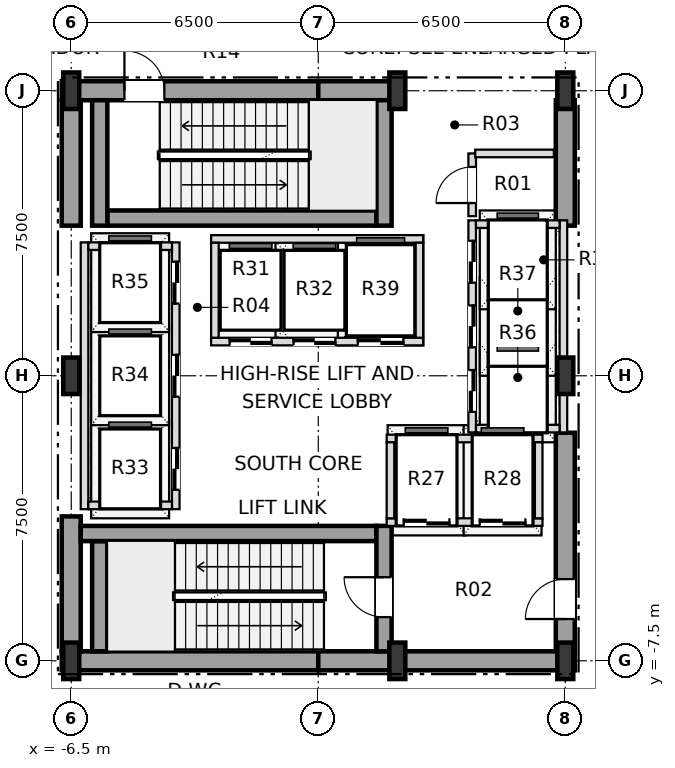
"""IFC4 building model, lengths in metres.
Left out: names, types, materials, properties, quantities, classifications, styles, units other than length and angle.
Written with IfcOpenShell. Run it as: python <this file> out.ifc"""

import sys

from ifc_helpers import new_model, si_unit, direction, frame, frame_2d, origin, origin_2d, place, context, subcontext, project, spatial, rectangle, i_section, extrude, element, fill, save


model = new_model("IFC4")
c1 = context("Model", 3, precision=1e-05, world=origin(), true_north=direction((0.0, 1.0)))
c2 = subcontext(c1, "Body", "Model", "MODEL_VIEW")
j1 = project(units=[si_unit("LENGTHUNIT", "METRE"), si_unit("PLANEANGLEUNIT", "RADIAN")], contexts=[c1])
p1 = place(None, origin())
s1 = spatial("IfcSite", under=j1, at=p1, CompositionType="ELEMENT")
p2 = place(p1, origin())
s2 = spatial("IfcBuilding", under=s1, at=p2, CompositionType="ELEMENT")
p3 = place(p2, frame((0.0, 0.0, 22.2)))
s3 = spatial("IfcBuildingStorey", under=s2, at=p3, CompositionType="ELEMENT", Elevation=22.2)
for number, where, z_axis, x_axis in (
    (1, (-6.5, -7.5, 0.0), (0.0, 0.0, 1.0), (1.0, 0.0, 0.0)),
    (2, (2.08, -7.5, 0.0), (0.0, 0.0, 1.0), (1.0, 0.0, 0.0)),
    (3, (6.5, -7.5, 0.0), (0.0, 0.0, 1.0), (1.0, 0.0, 0.0)),
    (4, (-6.5, 0.0, 0.0), (0.0, 0.0, 1.0), (1.0, 0.0, 0.0)),
    (5, (6.5, 0.0, 0.0), (0.0, 0.0, 1.0), (1.0, 0.0, 0.0)),
    (6, (-6.5, 7.5, 0.0), (0.0, 0.0, 1.0), (1.0, 0.0, 0.0)),
    (7, (2.08, 7.5, 0.0), (0.0, 0.0, 1.0), (1.0, 0.0, 0.0)),
    (8, (6.5, 7.5, 0.0), (0.0, 0.0, 1.0), (1.0, 0.0, 0.0)),
):
    element("IfcColumn", number, at=place(p3, frame(where, z_axis=z_axis, x_axis=x_axis)), inside=s3, PredefinedType="COLUMN", context=c2, shape_type="SweptSolid", body=[
        extrude(i_section(OverallWidth=0.42, OverallDepth=0.96, WebThickness=0.022, FlangeThickness=0.034, at=origin_2d()), origin(), (0.0, 0.0, 1.0), 5.4),
    ])
for number, where, z_axis, x_axis in (
    (9, (-6.75, -7.5, 0.0), (0.0, 0.0, 1.0), (1.0, 0.0, 0.0)),
    (10, (0.0, -7.5, 0.0), (0.0, 0.0, 1.0), (1.0, 0.0, 0.0)),
):
    element("IfcWall", number, at=place(p3, frame(where, z_axis=z_axis, x_axis=x_axis)), inside=s3, PredefinedType="SHEAR", context=c2, shape_type="SweptSolid", body=[
        extrude(rectangle(XDim=6.75, YDim=0.5, at=frame_2d((3.375, 0.0))), origin(), (0.0, 0.0, 1.0), 5.0),
    ])
p4 = place(p3, frame((-6.75, 7.5, 0.0), z_axis=(0.0, 0.0, 1.0), x_axis=(1.0, 0.0, 0.0)))
e11 = element("IfcWall", 11, at=p4, inside=s3, PredefinedType="SHEAR", context=c2, shape_type="SweptSolid", body=[
    extrude(rectangle(XDim=6.75, YDim=0.5, at=frame_2d((3.375, 0.0))), origin(), (0.0, 0.0, 1.0), 5.0),
])
p5 = place(p4, frame((1.65, 0.0, 0.0)))
e12 = element("IfcOpeningElement", 12, at=p5, cuts=e11, PredefinedType="OPENING", context=c2, shape_type="SweptSolid", body=[
    extrude(rectangle(XDim=1.05, YDim=2.15, at=frame_2d((0.525, 1.075))), frame((0.0, 0.26, 0.0), z_axis=(0.0, -1.0, 0.0), x_axis=(1.0, 0.0, 0.0)), (0.0, 0.0, 1.0), 0.52),
])
p6 = place(p3, frame((0.0, 7.5, 0.0), z_axis=(0.0, 0.0, 1.0), x_axis=(1.0, 0.0, 0.0)))
e13 = element("IfcWall", 13, at=p6, inside=s3, PredefinedType="SHEAR", context=c2, shape_type="SweptSolid", body=[
    extrude(rectangle(XDim=2.08, YDim=0.5, at=frame_2d((1.04, 0.0))), origin(), (0.0, 0.0, 1.0), 5.0),
])
p7 = place(p3, frame((-6.5, -7.25, 0.0), z_axis=(0.0, 0.0, 1.0), x_axis=(0.0, 1.0, 0.0)))
e14 = element("IfcWall", 14, at=p7, inside=s3, PredefinedType="SHEAR", context=c2, shape_type="SweptSolid", body=[
    extrude(rectangle(XDim=3.55, YDim=0.5, at=frame_2d((1.775, 0.0))), origin(), (0.0, 0.0, 1.0), 5.0),
])
p8 = place(p3, frame((-6.5, 3.95, 0.0), z_axis=(0.0, 0.0, 1.0), x_axis=(0.0, 1.0, 0.0)))
e15 = element("IfcWall", 15, at=p8, inside=s3, PredefinedType="SHEAR", context=c2, shape_type="SweptSolid", body=[
    extrude(rectangle(XDim=3.3, YDim=0.5, at=frame_2d((1.65, 0.0))), origin(), (0.0, 0.0, 1.0), 5.0),
])
p9 = place(p3, frame((6.5, -7.25, 0.0), z_axis=(0.0, 0.0, 1.0), x_axis=(0.0, 1.0, 0.0)))
e16 = element("IfcWall", 16, at=p9, inside=s3, PredefinedType="SHEAR", context=c2, shape_type="SweptSolid", body=[
    extrude(rectangle(XDim=5.75, YDim=0.5, at=frame_2d((2.875, 0.0))), origin(), (0.0, 0.0, 1.0), 5.0),
])
p10 = place(p9, frame((0.85, 0.0, 0.0)))
e17 = element("IfcOpeningElement", 17, at=p10, cuts=e16, PredefinedType="OPENING", context=c2, shape_type="SweptSolid", body=[
    extrude(rectangle(XDim=1.05, YDim=2.15, at=frame_2d((0.525, 1.075))), frame((0.0, 0.26, 0.0), z_axis=(0.0, -1.0, 0.0), x_axis=(1.0, 0.0, 0.0)), (0.0, 0.0, 1.0), 0.52),
])
p11 = place(p3, frame((6.5, 3.95, 0.0), z_axis=(0.0, 0.0, 1.0), x_axis=(0.0, 1.0, 0.0)))
e18 = element("IfcWall", 18, at=p11, inside=s3, PredefinedType="SHEAR", context=c2, shape_type="SweptSolid", body=[
    extrude(rectangle(XDim=3.3, YDim=0.5, at=frame_2d((1.65, 0.0))), origin(), (0.0, 0.0, 1.0), 5.0),
])
p12 = place(p3, frame((-5.75, -7.25, 0.0), z_axis=(0.0, 0.0, 1.0), x_axis=(0.0, 1.0, 0.0)))
e19 = element("IfcWall", 19, at=p12, inside=s3, PredefinedType="SHEAR", context=c2, shape_type="SweptSolid", body=[
    extrude(rectangle(XDim=2.9, YDim=0.4, at=frame_2d((1.45, 0.0))), origin(), (0.0, 0.0, 1.0), 5.0),
])
p13 = place(p3, frame((-6.25, -4.15, 0.0), z_axis=(0.0, 0.0, 1.0), x_axis=(1.0, 0.0, 0.0)))
e20 = element("IfcWall", 20, at=p13, inside=s3, PredefinedType="SHEAR", context=c2, shape_type="SweptSolid", body=[
    extrude(rectangle(XDim=7.78, YDim=0.4, at=frame_2d((3.89, 0.0))), origin(), (0.0, 0.0, 1.0), 5.0),
])
p14 = place(p3, frame((1.73, -7.25, 0.0), z_axis=(0.0, 0.0, 1.0), x_axis=(0.0, 1.0, 0.0)))
e21 = element("IfcWall", 21, at=p14, inside=s3, PredefinedType="SHEAR", context=c2, shape_type="SweptSolid", body=[
    extrude(rectangle(XDim=3.3, YDim=0.4, at=frame_2d((1.65, 0.0))), origin(), (0.0, 0.0, 1.0), 5.0),
])
p15 = place(p14, frame((0.9, 0.0, 0.0)))
e22 = element("IfcOpeningElement", 22, at=p15, cuts=e21, PredefinedType="OPENING", context=c2, shape_type="SweptSolid", body=[
    extrude(rectangle(XDim=1.05, YDim=2.15, at=frame_2d((0.525, 1.075))), frame((0.0, 0.21, 0.0), z_axis=(0.0, -1.0, 0.0), x_axis=(1.0, 0.0, 0.0)), (0.0, 0.0, 1.0), 0.42),
])
p16 = place(p3, frame((-5.55, 4.15, 0.0), z_axis=(0.0, 0.0, 1.0), x_axis=(1.0, 0.0, 0.0)))
e23 = element("IfcWall", 23, at=p16, inside=s3, PredefinedType="SHEAR", context=c2, shape_type="SweptSolid", body=[
    extrude(rectangle(XDim=7.08, YDim=0.4, at=frame_2d((3.54, 0.0))), origin(), (0.0, 0.0, 1.0), 5.0),
])
for number, where, z_axis, x_axis in (
    (24, (1.73, 3.95, 0.0), (0.0, 0.0, 1.0), (0.0, 1.0, 0.0)),
    (25, (-5.75, 3.95, 0.0), (0.0, 0.0, 1.0), (0.0, 1.0, 0.0)),
):
    element("IfcWall", number, at=place(p3, frame(where, z_axis=z_axis, x_axis=x_axis)), inside=s3, PredefinedType="SHEAR", context=c2, shape_type="SweptSolid", body=[
        extrude(rectangle(XDim=3.3, YDim=0.4, at=frame_2d((1.65, 0.0))), origin(), (0.0, 0.0, 1.0), 5.0),
    ])
p17 = place(p3, frame((-3.75, -3.51, 0.0), z_axis=(0.0, 0.0, 1.0), x_axis=(0.0, 1.0, 0.0)))
e26 = element("IfcWall", 26, at=p17, inside=s3, PredefinedType="SOLIDWALL", context=c2, shape_type="SweptSolid", body=[
    extrude(rectangle(XDim=7.02, YDim=0.2, at=frame_2d((3.51, 0.0))), origin(), (0.0, 0.0, 1.0), 5.0),
])
p18 = place(p17, frame((0.51, 0.0, 0.0)))
e27 = element("IfcOpeningElement", 27, at=p18, cuts=e26, PredefinedType="OPENING", context=c2, shape_type="SweptSolid", body=[
    extrude(rectangle(XDim=1.1, YDim=2.15, at=frame_2d((0.55, 1.075))), frame((0.0, 0.11, 0.0), z_axis=(0.0, -1.0, 0.0), x_axis=(1.0, 0.0, 0.0)), (0.0, 0.0, 1.0), 0.22),
])
p19 = place(p17, frame((2.96, 0.0, 0.0)))
e28 = element("IfcOpeningElement", 28, at=p19, cuts=e26, PredefinedType="OPENING", context=c2, shape_type="SweptSolid", body=[
    extrude(rectangle(XDim=1.1, YDim=2.15, at=frame_2d((0.55, 1.075))), frame((0.0, 0.11, 0.0), z_axis=(0.0, -1.0, 0.0), x_axis=(1.0, 0.0, 0.0)), (0.0, 0.0, 1.0), 0.22),
])
p20 = place(p17, frame((5.41, 0.0, 0.0)))
e29 = element("IfcOpeningElement", 29, at=p20, cuts=e26, PredefinedType="OPENING", context=c2, shape_type="SweptSolid", body=[
    extrude(rectangle(XDim=1.1, YDim=2.15, at=frame_2d((0.55, 1.075))), frame((0.0, 0.11, 0.0), z_axis=(0.0, -1.0, 0.0), x_axis=(1.0, 0.0, 0.0)), (0.0, 0.0, 1.0), 0.22),
])
p21 = place(p3, frame((-6.15, -3.51, 0.0), z_axis=(0.0, 0.0, 1.0), x_axis=(0.0, 1.0, 0.0)))
e30 = element("IfcWall", 30, at=p21, inside=s3, PredefinedType="SOLIDWALL", context=c2, shape_type="SweptSolid", body=[
    extrude(rectangle(XDim=7.02, YDim=0.2, at=frame_2d((3.51, 0.0))), origin(), (0.0, 0.0, 1.0), 5.0),
])
for number, where, z_axis, x_axis in (
    (31, (-6.05, -3.41, 0.0), (0.0, 0.0, 1.0), (1.0, 0.0, 0.0)),
    (32, (-6.05, 3.41, 0.0), (0.0, 0.0, 1.0), (1.0, 0.0, 0.0)),
):
    element("IfcWall", number, at=place(p3, frame(where, z_axis=z_axis, x_axis=x_axis)), inside=s3, PredefinedType="SOLIDWALL", context=c2, shape_type="SweptSolid", body=[
        extrude(rectangle(XDim=2.2, YDim=0.2, at=frame_2d((1.1, 0.0))), origin(), (0.0, 0.0, 1.0), 5.0),
    ])
p22 = place(p3, frame((4.05, -1.49, 0.0), z_axis=(0.0, 0.0, 1.0), x_axis=(0.0, 1.0, 0.0)))
e33 = element("IfcWall", 33, at=p22, inside=s3, PredefinedType="SOLIDWALL", context=c2, shape_type="SweptSolid", body=[
    extrude(rectangle(XDim=5.58, YDim=0.2, at=frame_2d((2.79, 0.0))), origin(), (0.0, 0.0, 1.0), 5.0),
])
p23 = place(p22, frame((0.54, 0.0, 0.0)))
e34 = element("IfcOpeningElement", 34, at=p23, cuts=e33, PredefinedType="OPENING", context=c2, shape_type="SweptSolid", body=[
    extrude(rectangle(XDim=1.1, YDim=2.15, at=frame_2d((0.55, 1.075))), frame((0.0, 0.11, 0.0), z_axis=(0.0, -1.0, 0.0), x_axis=(1.0, 0.0, 0.0)), (0.0, 0.0, 1.0), 0.22),
])
p24 = place(p22, frame((2.24, 0.0, 0.0)))
e35 = element("IfcOpeningElement", 35, at=p24, cuts=e33, PredefinedType="OPENING", context=c2, shape_type="SweptSolid", body=[
    extrude(rectangle(XDim=1.1, YDim=2.15, at=frame_2d((0.55, 1.075))), frame((0.0, 0.11, 0.0), z_axis=(0.0, -1.0, 0.0), x_axis=(1.0, 0.0, 0.0)), (0.0, 0.0, 1.0), 0.22),
])
p25 = place(p22, frame((3.94, 0.0, 0.0)))
e36 = element("IfcOpeningElement", 36, at=p25, cuts=e33, PredefinedType="OPENING", context=c2, shape_type="SweptSolid", body=[
    extrude(rectangle(XDim=1.1, YDim=2.15, at=frame_2d((0.55, 1.075))), frame((0.0, 0.11, 0.0), z_axis=(0.0, -1.0, 0.0), x_axis=(1.0, 0.0, 0.0)), (0.0, 0.0, 1.0), 0.22),
])
p26 = place(p3, frame((6.45, -1.49, 0.0), z_axis=(0.0, 0.0, 1.0), x_axis=(0.0, 1.0, 0.0)))
e37 = element("IfcWall", 37, at=p26, inside=s3, PredefinedType="SOLIDWALL", context=c2, shape_type="SweptSolid", body=[
    extrude(rectangle(XDim=5.58, YDim=0.2, at=frame_2d((2.79, 0.0))), origin(), (0.0, 0.0, 1.0), 4.436),
])
for number, where, z_axis, x_axis in (
    (38, (4.15, -1.39, 0.0), (0.0, 0.0, 1.0), (1.0, 0.0, 0.0)),
    (39, (4.15, 3.99, 0.0), (0.0, 0.0, 1.0), (1.0, 0.0, 0.0)),
):
    element("IfcWall", number, at=place(p3, frame(where, z_axis=z_axis, x_axis=x_axis)), inside=s3, PredefinedType="SOLIDWALL", context=c2, shape_type="SweptSolid", body=[
        extrude(rectangle(XDim=2.2, YDim=0.2, at=frame_2d((1.1, 0.0))), origin(), (0.0, 0.0, 1.0), 5.0),
    ])
p27 = place(p3, frame((-2.82, 0.9, 0.0), z_axis=(0.0, 0.0, 1.0), x_axis=(1.0, 0.0, 0.0)))
e40 = element("IfcWall", 40, at=p27, inside=s3, PredefinedType="SOLIDWALL", context=c2, shape_type="SweptSolid", body=[
    extrude(rectangle(XDim=5.58, YDim=0.2, at=frame_2d((2.79, 0.0))), origin(), (0.0, 0.0, 1.0), 5.0),
])
p28 = place(p27, frame((0.49, 0.0, 0.0)))
e41 = element("IfcOpeningElement", 41, at=p28, cuts=e40, PredefinedType="OPENING", context=c2, shape_type="SweptSolid", body=[
    extrude(rectangle(XDim=1.1, YDim=2.15, at=frame_2d((0.55, 1.075))), frame((0.0, 0.11, 0.0), z_axis=(0.0, -1.0, 0.0), x_axis=(1.0, 0.0, 0.0)), (0.0, 0.0, 1.0), 0.22),
])
p29 = place(p27, frame((2.17, 0.0, 0.0)))
e42 = element("IfcOpeningElement", 42, at=p29, cuts=e40, PredefinedType="OPENING", context=c2, shape_type="SweptSolid", body=[
    extrude(rectangle(XDim=1.1, YDim=2.15, at=frame_2d((0.55, 1.075))), frame((0.0, 0.11, 0.0), z_axis=(0.0, -1.0, 0.0), x_axis=(1.0, 0.0, 0.0)), (0.0, 0.0, 1.0), 0.22),
])
p30 = place(p27, frame((3.86, 0.0, 0.0)))
e43 = element("IfcOpeningElement", 43, at=p30, cuts=e40, PredefinedType="OPENING", context=c2, shape_type="SweptSolid", body=[
    extrude(rectangle(XDim=1.2, YDim=2.2, at=frame_2d((0.6, 1.1))), frame((0.0, 0.11, 0.0), z_axis=(0.0, -1.0, 0.0), x_axis=(1.0, 0.0, 0.0)), (0.0, 0.0, 1.0), 0.22),
])
p31 = place(p3, frame((-2.82, 3.6, 0.0), z_axis=(0.0, 0.0, 1.0), x_axis=(1.0, 0.0, 0.0)))
e44 = element("IfcWall", 44, at=p31, inside=s3, PredefinedType="SOLIDWALL", context=c2, shape_type="SweptSolid", body=[
    extrude(rectangle(XDim=5.58, YDim=0.2, at=frame_2d((2.79, 0.0))), origin(), (0.0, 0.0, 1.0), 5.0),
])
for number, where, z_axis, x_axis in (
    (45, (-2.72, 1.0, 0.0), (0.0, 0.0, 1.0), (0.0, 1.0, 0.0)),
    (46, (2.66, 1.0, 0.0), (0.0, 0.0, 1.0), (0.0, 1.0, 0.0)),
):
    element("IfcWall", number, at=place(p3, frame(where, z_axis=z_axis, x_axis=x_axis)), inside=s3, PredefinedType="SOLIDWALL", context=c2, shape_type="SweptSolid", body=[
        extrude(rectangle(XDim=2.5, YDim=0.2, at=frame_2d((1.25, 0.0))), origin(), (0.0, 0.0, 1.0), 5.0),
    ])
p32 = place(p3, frame((1.8, -3.85, 0.0), z_axis=(0.0, 0.0, 1.0), x_axis=(1.0, 0.0, 0.0)))
e47 = element("IfcWall", 47, at=p32, inside=s3, PredefinedType="SOLIDWALL", context=c2, shape_type="SweptSolid", body=[
    extrude(rectangle(XDim=4.1, YDim=0.2, at=frame_2d((2.05, 0.0))), origin(), (0.0, 0.0, 1.0), 5.0),
])
p33 = place(p32, frame((0.45, 0.0, 0.0)))
e48 = element("IfcOpeningElement", 48, at=p33, cuts=e47, PredefinedType="OPENING", context=c2, shape_type="SweptSolid", body=[
    extrude(rectangle(XDim=1.2, YDim=2.2, at=frame_2d((0.6, 1.1))), frame((0.0, 0.11, 0.0), z_axis=(0.0, -1.0, 0.0), x_axis=(1.0, 0.0, 0.0)), (0.0, 0.0, 1.0), 0.22),
])
p34 = place(p32, frame((2.45, 0.0, 0.0)))
e49 = element("IfcOpeningElement", 49, at=p34, cuts=e47, PredefinedType="OPENING", context=c2, shape_type="SweptSolid", body=[
    extrude(rectangle(XDim=1.2, YDim=2.2, at=frame_2d((0.6, 1.1))), frame((0.0, 0.11, 0.0), z_axis=(0.0, -1.0, 0.0), x_axis=(1.0, 0.0, 0.0)), (0.0, 0.0, 1.0), 0.22),
])
p35 = place(p3, frame((1.8, -1.65, 0.0), z_axis=(0.0, 0.0, 1.0), x_axis=(1.0, 0.0, 0.0)))
e50 = element("IfcWall", 50, at=p35, inside=s3, PredefinedType="SOLIDWALL", context=c2, shape_type="SweptSolid", body=[
    extrude(rectangle(XDim=4.1, YDim=0.2, at=frame_2d((2.05, 0.0))), origin(), (0.0, 0.0, 1.0), 5.0),
])
for number, where, z_axis, x_axis in (
    (51, (1.9, -3.75, 0.0), (0.0, 0.0, 1.0), (0.0, 1.0, 0.0)),
    (52, (5.8, -3.75, 0.0), (0.0, 0.0, 1.0), (0.0, 1.0, 0.0)),
):
    element("IfcWall", number, at=place(p3, frame(where, z_axis=z_axis, x_axis=x_axis)), inside=s3, PredefinedType="SOLIDWALL", context=c2, shape_type="SweptSolid", body=[
        extrude(rectangle(XDim=2.0, YDim=0.2, at=frame_2d((1.0, 0.0))), origin(), (0.0, 0.0, 1.0), 5.0),
    ])
p36 = place(p3, frame((4.05, 4.2, 0.0), z_axis=(0.0, 0.0, 1.0), x_axis=(0.0, 1.0, 0.0)))
e53 = element("IfcWall", 53, at=p36, inside=s3, PredefinedType="SOLIDWALL", context=c2, shape_type="SweptSolid", body=[
    extrude(rectangle(XDim=1.65, YDim=0.2, at=frame_2d((0.825, 0.0))), origin(), (0.0, 0.0, 1.0), 5.0),
])
p37 = place(p36, frame((0.345, 0.0, 0.0)))
e54 = element("IfcOpeningElement", 54, at=p37, cuts=e53, PredefinedType="OPENING", context=c2, shape_type="SweptSolid", body=[
    extrude(rectangle(XDim=0.95, YDim=2.15, at=frame_2d((0.475, 1.075))), frame((0.0, 0.11, 0.0), z_axis=(0.0, -1.0, 0.0), x_axis=(1.0, 0.0, 0.0)), (0.0, 0.0, 1.0), 0.22),
])
p38 = place(p3, frame((4.13, 5.85, 0.0), z_axis=(0.0, 0.0, 1.0), x_axis=(1.0, 0.0, 0.0)))
e55 = element("IfcWall", 55, at=p38, inside=s3, PredefinedType="SOLIDWALL", context=c2, shape_type="SweptSolid", body=[
    extrude(rectangle(XDim=2.07, YDim=0.2, at=frame_2d((1.035, 0.0))), origin(), (0.0, 0.0, 1.0), 5.0),
])
p39 = place(p10, origin())
e56 = element("IfcDoor", 56, at=p39, inside=s3, OperationType="SINGLE_SWING_LEFT", PredefinedType="DOOR", context=c2, shape_type="SweptSolid", body=[
    extrude(rectangle(XDim=1.05, YDim=2.15, at=frame_2d((0.525, 1.075))), frame((0.0, 0.025, 0.0), z_axis=(0.0, -1.0, 0.0), x_axis=(1.0, 0.0, 0.0)), (0.0, 0.0, 1.0), 0.05),
])
fill(e17, e56)
p40 = place(p15, origin())
e57 = element("IfcDoor", 57, at=p40, inside=s3, OperationType="SINGLE_SWING_RIGHT", PredefinedType="DOOR", context=c2, shape_type="SweptSolid", body=[
    extrude(rectangle(XDim=1.05, YDim=2.15, at=frame_2d((0.525, 1.075))), frame((0.0, 0.025, 0.0), z_axis=(0.0, -1.0, 0.0), x_axis=(1.0, 0.0, 0.0)), (0.0, 0.0, 1.0), 0.05),
])
fill(e22, e57)
p41 = place(p5, origin())
e58 = element("IfcDoor", 58, at=p41, inside=s3, OperationType="SINGLE_SWING_LEFT", PredefinedType="DOOR", context=c2, shape_type="SweptSolid", body=[
    extrude(rectangle(XDim=1.05, YDim=2.15, at=frame_2d((0.525, 1.075))), frame((0.0, 0.025, 0.0), z_axis=(0.0, -1.0, 0.0), x_axis=(1.0, 0.0, 0.0)), (0.0, 0.0, 1.0), 0.05),
])
fill(e12, e58)
p42 = place(p18, origin())
e59 = element("IfcDoor", 59, at=p42, inside=s3, OperationType="DOUBLE_DOOR_SLIDING", PredefinedType="DOOR", context=c2, shape_type="SweptSolid", body=[
    extrude(rectangle(XDim=1.1, YDim=2.15, at=frame_2d((0.55, 1.075))), frame((0.0, 0.025, 0.0), z_axis=(0.0, -1.0, 0.0), x_axis=(1.0, 0.0, 0.0)), (0.0, 0.0, 1.0), 0.05),
])
fill(e27, e59)
p43 = place(p19, origin())
e60 = element("IfcDoor", 60, at=p43, inside=s3, OperationType="DOUBLE_DOOR_SLIDING", PredefinedType="DOOR", context=c2, shape_type="SweptSolid", body=[
    extrude(rectangle(XDim=1.1, YDim=2.15, at=frame_2d((0.55, 1.075))), frame((0.0, 0.025, 0.0), z_axis=(0.0, -1.0, 0.0), x_axis=(1.0, 0.0, 0.0)), (0.0, 0.0, 1.0), 0.05),
])
fill(e28, e60)
p44 = place(p20, origin())
e61 = element("IfcDoor", 61, at=p44, inside=s3, OperationType="DOUBLE_DOOR_SLIDING", PredefinedType="DOOR", context=c2, shape_type="SweptSolid", body=[
    extrude(rectangle(XDim=1.1, YDim=2.15, at=frame_2d((0.55, 1.075))), frame((0.0, 0.025, 0.0), z_axis=(0.0, -1.0, 0.0), x_axis=(1.0, 0.0, 0.0)), (0.0, 0.0, 1.0), 0.05),
])
fill(e29, e61)
p45 = place(p23, origin())
e62 = element("IfcDoor", 62, at=p45, inside=s3, OperationType="DOUBLE_DOOR_SLIDING", PredefinedType="DOOR", context=c2, shape_type="SweptSolid", body=[
    extrude(rectangle(XDim=1.1, YDim=2.15, at=frame_2d((0.55, 1.075))), frame((0.0, 0.025, 0.0), z_axis=(0.0, -1.0, 0.0), x_axis=(1.0, 0.0, 0.0)), (0.0, 0.0, 1.0), 0.05),
])
fill(e34, e62)
p46 = place(p24, origin())
e63 = element("IfcDoor", 63, at=p46, inside=s3, OperationType="DOUBLE_DOOR_SLIDING", PredefinedType="DOOR", context=c2, shape_type="SweptSolid", body=[
    extrude(rectangle(XDim=1.1, YDim=2.15, at=frame_2d((0.55, 1.075))), frame((0.0, 0.025, 0.0), z_axis=(0.0, -1.0, 0.0), x_axis=(1.0, 0.0, 0.0)), (0.0, 0.0, 1.0), 0.05),
])
fill(e35, e63)
p47 = place(p25, origin())
e64 = element("IfcDoor", 64, at=p47, inside=s3, OperationType="DOUBLE_DOOR_SLIDING", PredefinedType="DOOR", context=c2, shape_type="SweptSolid", body=[
    extrude(rectangle(XDim=1.1, YDim=2.15, at=frame_2d((0.55, 1.075))), frame((0.0, 0.025, 0.0), z_axis=(0.0, -1.0, 0.0), x_axis=(1.0, 0.0, 0.0)), (0.0, 0.0, 1.0), 0.05),
])
fill(e36, e64)
p48 = place(p28, origin())
e65 = element("IfcDoor", 65, at=p48, inside=s3, OperationType="DOUBLE_DOOR_SLIDING", PredefinedType="DOOR", context=c2, shape_type="SweptSolid", body=[
    extrude(rectangle(XDim=1.1, YDim=2.15, at=frame_2d((0.55, 1.075))), frame((0.0, 0.025, 0.0), z_axis=(0.0, -1.0, 0.0), x_axis=(1.0, 0.0, 0.0)), (0.0, 0.0, 1.0), 0.05),
])
fill(e41, e65)
p49 = place(p29, origin())
e66 = element("IfcDoor", 66, at=p49, inside=s3, OperationType="DOUBLE_DOOR_SLIDING", PredefinedType="DOOR", context=c2, shape_type="SweptSolid", body=[
    extrude(rectangle(XDim=1.1, YDim=2.15, at=frame_2d((0.55, 1.075))), frame((0.0, 0.025, 0.0), z_axis=(0.0, -1.0, 0.0), x_axis=(1.0, 0.0, 0.0)), (0.0, 0.0, 1.0), 0.05),
])
fill(e42, e66)
p50 = place(p30, origin())
e67 = element("IfcDoor", 67, at=p50, inside=s3, OperationType="DOUBLE_DOOR_SLIDING", PredefinedType="DOOR", context=c2, shape_type="SweptSolid", body=[
    extrude(rectangle(XDim=1.2, YDim=2.2, at=frame_2d((0.6, 1.1))), frame((0.0, 0.025, 0.0), z_axis=(0.0, -1.0, 0.0), x_axis=(1.0, 0.0, 0.0)), (0.0, 0.0, 1.0), 0.05),
])
fill(e43, e67)
p51 = place(p33, origin())
e68 = element("IfcDoor", 68, at=p51, inside=s3, OperationType="DOUBLE_DOOR_SLIDING", PredefinedType="DOOR", context=c2, shape_type="SweptSolid", body=[
    extrude(rectangle(XDim=1.2, YDim=2.2, at=frame_2d((0.6, 1.1))), frame((0.0, 0.025, 0.0), z_axis=(0.0, -1.0, 0.0), x_axis=(1.0, 0.0, 0.0)), (0.0, 0.0, 1.0), 0.05),
])
fill(e48, e68)
p52 = place(p34, origin())
e69 = element("IfcDoor", 69, at=p52, inside=s3, OperationType="DOUBLE_DOOR_SLIDING", PredefinedType="DOOR", context=c2, shape_type="SweptSolid", body=[
    extrude(rectangle(XDim=1.2, YDim=2.2, at=frame_2d((0.6, 1.1))), frame((0.0, 0.025, 0.0), z_axis=(0.0, -1.0, 0.0), x_axis=(1.0, 0.0, 0.0)), (0.0, 0.0, 1.0), 0.05),
])
fill(e49, e69)
p53 = place(p37, origin())
e70 = element("IfcDoor", 70, at=p53, inside=s3, OperationType="SINGLE_SWING_LEFT", PredefinedType="DOOR", context=c2, shape_type="SweptSolid", body=[
    extrude(rectangle(XDim=0.95, YDim=2.15, at=frame_2d((0.475, 1.075))), frame((0.0, 0.025, 0.0), z_axis=(0.0, -1.0, 0.0), x_axis=(1.0, 0.0, 0.0)), (0.0, 0.0, 1.0), 0.05),
])
fill(e54, e70)
save(model, sys.argv[1])
